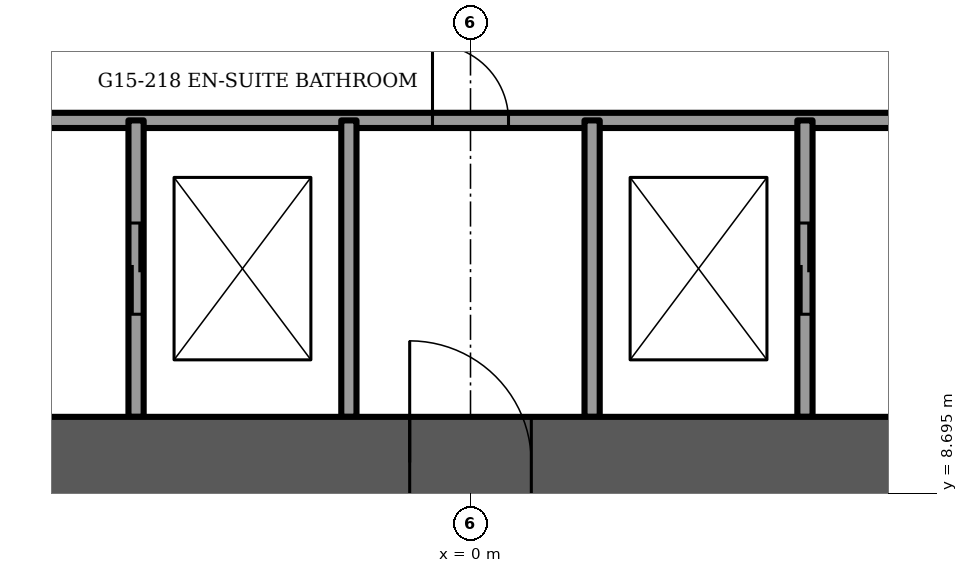
"""IFC4 building model, lengths in metres.
Left out: names, types, materials, properties, quantities, classifications, styles, units other than length and angle.
Written with IfcOpenShell. Run it as: python <this file> out.ifc"""

import sys

from ifc_helpers import new_model, si_unit, direction, frame, frame_2d, origin, place, context, subcontext, project, spatial, rectangle, extrude, element, fill, save


model = new_model("IFC4")
c1 = context("Model", 3, precision=1e-05, world=origin(), true_north=direction((0.0, 1.0)))
c2 = subcontext(c1, "Body", "Model", "MODEL_VIEW")
j1 = project(units=[si_unit("LENGTHUNIT", "METRE"), si_unit("PLANEANGLEUNIT", "RADIAN")], contexts=[c1])
p1 = place(None, origin())
s1 = spatial("IfcSite", under=j1, at=p1, CompositionType="ELEMENT")
p2 = place(p1, origin())
s2 = spatial("IfcBuilding", under=s1, at=p2, CompositionType="ELEMENT")
p3 = place(p2, frame((0.0, 0.0, 61.75)))
s3 = spatial("IfcBuildingStorey", under=s2, at=p3, CompositionType="ELEMENT", Elevation=61.75)
p4 = place(p3, frame((-12.0, 9.1, -0.3), z_axis=(0.0, 0.0, 1.0), x_axis=(1.0, 0.0, 0.0)))
e1 = element("IfcWall", 1, at=p4, inside=s3, PredefinedType="SHEAR", context=c2, shape_type="SweptSolid", body=[
    extrude(rectangle(XDim=24.0, YDim=1.2, at=frame_2d((12.0, 0.0))), origin(), (0.0, 0.0, 1.0), 3.75),
])
p5 = place(p4, frame((11.2, 0.0, 0.0)))
e2 = element("IfcOpeningElement", 2, at=p5, cuts=e1, PredefinedType="OPENING", context=c2, shape_type="SweptSolid", body=[
    extrude(rectangle(XDim=1.6, YDim=2.1, at=frame_2d((0.8, 1.05))), frame((0.0, 0.6, 0.0), z_axis=(0.0, -1.0, 0.0), x_axis=(1.0, 0.0, 0.0)), (0.0, 0.0, 1.0), 1.2),
])
p6 = place(p4, frame((5.25, 0.0, 0.0)))
e3 = element("IfcOpeningElement", 3, at=p6, cuts=e1, PredefinedType="OPENING", context=c2, shape_type="SweptSolid", body=[
    extrude(rectangle(XDim=1.1, YDim=2.1, at=frame_2d((0.55, 1.05))), frame((0.0, 0.6, 0.0), z_axis=(0.0, -1.0, 0.0), x_axis=(1.0, 0.0, 0.0)), (0.0, 0.0, 1.0), 1.2),
])
p7 = place(p4, frame((17.65, 0.0, 0.0)))
e4 = element("IfcOpeningElement", 4, at=p7, cuts=e1, PredefinedType="OPENING", context=c2, shape_type="SweptSolid", body=[
    extrude(rectangle(XDim=1.1, YDim=2.1, at=frame_2d((0.55, 1.05))), frame((0.0, 0.6, 0.0), z_axis=(0.0, -1.0, 0.0), x_axis=(1.0, 0.0, 0.0)), (0.0, 0.0, 1.0), 1.2),
])
p8 = place(p3, frame((-8.5, 13.6, 0.0), z_axis=(0.0, 0.0, 1.0), x_axis=(1.0, 0.0, 0.0)))
e5 = element("IfcWall", 5, at=p8, inside=s3, PredefinedType="PARTITIONING", context=c2, shape_type="SweptSolid", body=[
    extrude(rectangle(XDim=17.0, YDim=0.2, at=frame_2d((8.5, 0.0))), origin(), (0.0, 0.0, 1.0), 3.45),
])
p9 = place(p8, frame((8.0, 0.0, 0.0)))
e6 = element("IfcOpeningElement", 6, at=p9, cuts=e5, PredefinedType="OPENING", context=c2, shape_type="SweptSolid", body=[
    extrude(rectangle(XDim=1.0, YDim=2.1, at=frame_2d((0.5, 1.05))), frame((0.0, 0.1, 0.0), z_axis=(0.0, -1.0, 0.0), x_axis=(1.0, 0.0, 0.0)), (0.0, 0.0, 1.0), 0.2),
])
p10 = place(p3, frame((-4.4, 9.7, 0.0), z_axis=(0.0, 0.0, 1.0), x_axis=(0.0, 1.0, 0.0)))
e7 = element("IfcWall", 7, at=p10, inside=s3, PredefinedType="PARTITIONING", context=c2, shape_type="SweptSolid", body=[
    extrude(rectangle(XDim=3.9, YDim=0.2, at=frame_2d((1.95, 0.0))), origin(), (0.0, 0.0, 1.0), 3.45),
])
p11 = place(p10, frame((1.35, 0.0, 0.0)))
e8 = element("IfcOpeningElement", 8, at=p11, cuts=e7, PredefinedType="OPENING", context=c2, shape_type="SweptSolid", body=[
    extrude(rectangle(XDim=1.2, YDim=2.1, at=frame_2d((0.6, 1.05))), frame((0.0, 0.1, 0.0), z_axis=(0.0, -1.0, 0.0), x_axis=(1.0, 0.0, 0.0)), (0.0, 0.0, 1.0), 0.2),
])
p12 = place(p3, frame((4.4, 9.7, 0.0), z_axis=(0.0, 0.0, 1.0), x_axis=(0.0, 1.0, 0.0)))
e9 = element("IfcWall", 9, at=p12, inside=s3, PredefinedType="PARTITIONING", context=c2, shape_type="SweptSolid", body=[
    extrude(rectangle(XDim=3.9, YDim=0.2, at=frame_2d((1.95, 0.0))), origin(), (0.0, 0.0, 1.0), 3.45),
])
p13 = place(p12, frame((1.35, 0.0, 0.0)))
e10 = element("IfcOpeningElement", 10, at=p13, cuts=e9, PredefinedType="OPENING", context=c2, shape_type="SweptSolid", body=[
    extrude(rectangle(XDim=1.2, YDim=2.1, at=frame_2d((0.6, 1.05))), frame((0.0, 0.1, 0.0), z_axis=(0.0, -1.0, 0.0), x_axis=(1.0, 0.0, 0.0)), (0.0, 0.0, 1.0), 0.2),
])
for number, where, z_axis, x_axis in (
    (11, (-1.6, 9.7, 0.0), (0.0, 0.0, 1.0), (0.0, 1.0, 0.0)),
    (12, (1.6, 9.7, 0.0), (0.0, 0.0, 1.0), (0.0, 1.0, 0.0)),
):
    element("IfcWall", number, at=place(p3, frame(where, z_axis=z_axis, x_axis=x_axis)), inside=s3, PredefinedType="PARTITIONING", context=c2, shape_type="SweptSolid", body=[
        extrude(rectangle(XDim=3.9, YDim=0.2, at=frame_2d((1.95, 0.0))), origin(), (0.0, 0.0, 1.0), 3.45),
    ])
p14 = place(p5, origin())
e13 = element("IfcDoor", 13, at=p14, inside=s3, OperationType="DOUBLE_DOOR_SINGLE_SWING", PredefinedType="DOOR", context=c2, shape_type="SweptSolid", body=[
    extrude(rectangle(XDim=1.6, YDim=2.1, at=frame_2d((0.8, 1.05))), frame((0.0, 0.025, 0.0), z_axis=(0.0, -1.0, 0.0), x_axis=(1.0, 0.0, 0.0)), (0.0, 0.0, 1.0), 0.05),
])
fill(e2, e13)
p15 = place(p11, origin())
e14 = element("IfcDoor", 14, at=p15, inside=s3, OperationType="SLIDING_TO_LEFT", PredefinedType="DOOR", context=c2, shape_type="SweptSolid", body=[
    extrude(rectangle(XDim=1.2, YDim=2.1, at=frame_2d((0.6, 1.05))), frame((0.0, 0.025, 0.0), z_axis=(0.0, -1.0, 0.0), x_axis=(1.0, 0.0, 0.0)), (0.0, 0.0, 1.0), 0.05),
])
fill(e8, e14)
p16 = place(p13, origin())
e15 = element("IfcDoor", 15, at=p16, inside=s3, OperationType="SLIDING_TO_LEFT", PredefinedType="DOOR", context=c2, shape_type="SweptSolid", body=[
    extrude(rectangle(XDim=1.2, YDim=2.1, at=frame_2d((0.6, 1.05))), frame((0.0, 0.025, 0.0), z_axis=(0.0, -1.0, 0.0), x_axis=(1.0, 0.0, 0.0)), (0.0, 0.0, 1.0), 0.05),
])
fill(e10, e15)
p17 = place(p9, origin())
e16 = element("IfcDoor", 16, at=p17, inside=s3, OperationType="SINGLE_SWING_LEFT", PredefinedType="DOOR", context=c2, shape_type="SweptSolid", body=[
    extrude(rectangle(XDim=1.0, YDim=2.1, at=frame_2d((0.5, 1.05))), frame((0.0, 0.025, 0.0), z_axis=(0.0, -1.0, 0.0), x_axis=(1.0, 0.0, 0.0)), (0.0, 0.0, 1.0), 0.05),
])
fill(e6, e16)
save(model, sys.argv[1])
